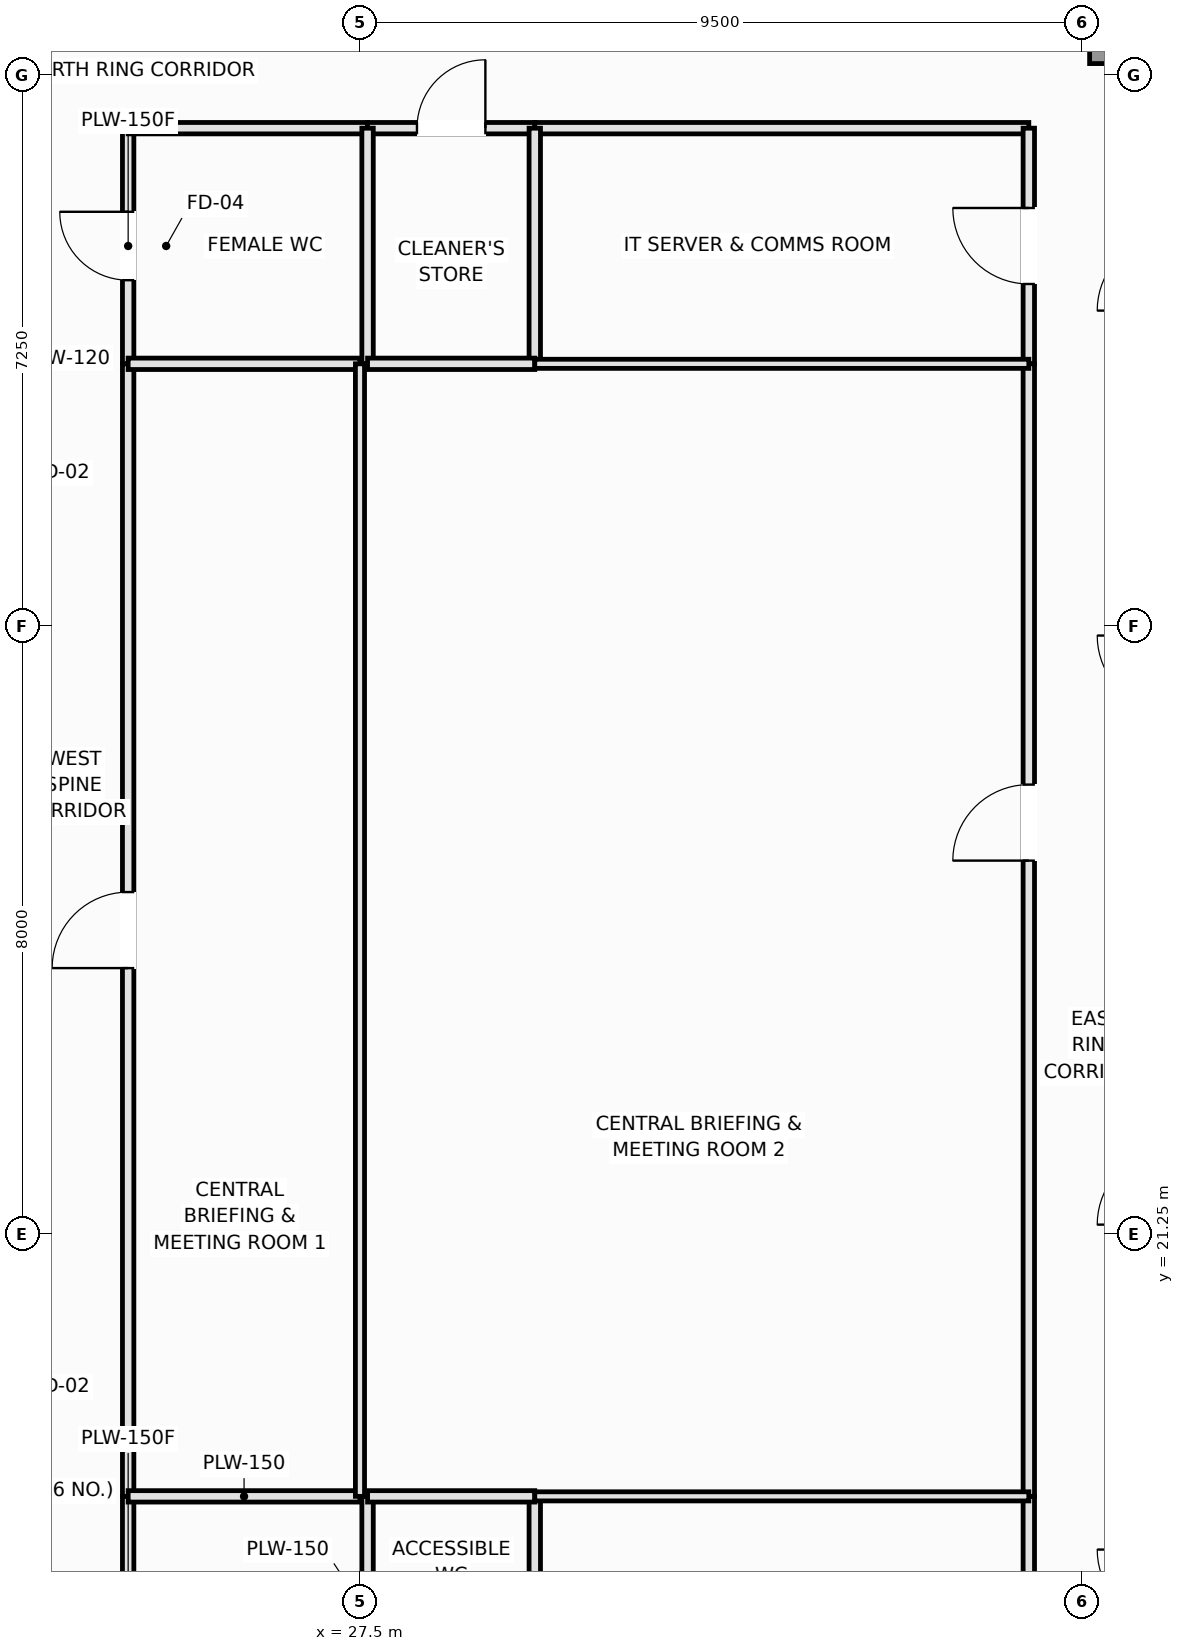
"""IFC4 building model, lengths in metres.
Left out: names, types, materials, properties, quantities, classifications, styles, units other than length and angle.
Written with IfcOpenShell. Run it as: python <this file> out.ifc"""

import sys

from ifc_helpers import new_model, si_unit, direction, frame, frame_2d, origin, origin_2d, place, context, subcontext, project, spatial, rectangle, extrude, element, fill, save


model = new_model("IFC4")
c1 = context("Model", 3, precision=1e-05, world=origin(), true_north=direction((0.0, 1.0)))
c2 = subcontext(c1, "Body", "Model", "MODEL_VIEW")
j1 = project(units=[si_unit("LENGTHUNIT", "METRE"), si_unit("PLANEANGLEUNIT", "RADIAN")], contexts=[c1])
p1 = place(None, origin())
s1 = spatial("IfcSite", under=j1, at=p1, CompositionType="ELEMENT")
p2 = place(p1, origin())
s2 = spatial("IfcBuilding", under=s1, at=p2, CompositionType="ELEMENT")
p3 = place(p2, frame((0.0, 0.0, 25.6)))
s3 = spatial("IfcBuildingStorey", under=s2, at=p3, CompositionType="ELEMENT", Elevation=25.6)
p4 = place(p3, frame((38.2, 37.75, 0.0), z_axis=(0.0, 0.0, 1.0), x_axis=(1.0, 0.0, 0.0)))
e1 = element("IfcColumn", 1, at=p4, inside=s3, PredefinedType="COLUMN", context=c2, shape_type="SweptSolid", body=[
    extrude(rectangle(XDim=2.2, YDim=2.2, at=origin_2d()), origin(), (0.0, 0.0, 1.0), 3.55),
])
p5 = place(p3, frame((24.45, 14.7, 0.0), z_axis=(0.0, 0.0, 1.0), x_axis=(0.0, 1.0, 0.0)))
e2 = element("IfcWall", 2, at=p5, inside=s3, PredefinedType="PLUMBINGWALL", context=c2, shape_type="SweptSolid", body=[
    extrude(rectangle(XDim=3.1, YDim=0.15, at=frame_2d((1.55, 0.0))), origin(), (0.0, 0.0, 1.0), 3.37),
])
p6 = place(p5, frame((1.1, 0.0, 0.0)))
e3 = element("IfcOpeningElement", 3, at=p6, cuts=e2, PredefinedType="OPENING", context=c2, shape_type="SweptSolid", body=[
    extrude(rectangle(XDim=0.9, YDim=2.1, at=frame_2d((0.45, 1.05))), frame((0.0, 0.085, 0.0), z_axis=(0.0, -1.0, 0.0), x_axis=(1.0, 0.0, 0.0)), (0.0, 0.0, 1.0), 0.17),
])
p7 = place(p3, frame((24.45, 32.7, 0.0), z_axis=(0.0, 0.0, 1.0), x_axis=(0.0, 1.0, 0.0)))
e4 = element("IfcWall", 4, at=p7, inside=s3, PredefinedType="PLUMBINGWALL", context=c2, shape_type="SweptSolid", body=[
    extrude(rectangle(XDim=3.1, YDim=0.15, at=frame_2d((1.55, 0.0))), origin(), (0.0, 0.0, 1.0), 3.37),
])
p8 = place(p7, frame((1.1, 0.0, 0.0)))
e5 = element("IfcOpeningElement", 5, at=p8, cuts=e4, PredefinedType="OPENING", context=c2, shape_type="SweptSolid", body=[
    extrude(rectangle(XDim=0.9, YDim=2.1, at=frame_2d((0.45, 1.05))), frame((0.0, 0.085, 0.0), z_axis=(0.0, -1.0, 0.0), x_axis=(1.0, 0.0, 0.0)), (0.0, 0.0, 1.0), 0.17),
])
p9 = place(p3, frame((24.45, 17.8, 0.0), z_axis=(0.0, 0.0, 1.0), x_axis=(0.0, 1.0, 0.0)))
e6 = element("IfcWall", 6, at=p9, inside=s3, PredefinedType="PARTITIONING", context=c2, shape_type="SweptSolid", body=[
    extrude(rectangle(XDim=14.9, YDim=0.15, at=frame_2d((7.45, 0.0))), origin(), (0.0, 0.0, 1.0), 3.37),
])
p10 = place(p9, frame((6.95, 0.0, 0.0)))
e7 = element("IfcOpeningElement", 7, at=p10, cuts=e6, PredefinedType="OPENING", context=c2, shape_type="SweptSolid", body=[
    extrude(rectangle(XDim=1.0, YDim=2.15, at=frame_2d((0.5, 1.075))), frame((0.0, 0.085, 0.0), z_axis=(0.0, -1.0, 0.0), x_axis=(1.0, 0.0, 0.0)), (0.0, 0.0, 1.0), 0.17),
])
p11 = place(p3, frame((24.45, 35.8, 0.0), z_axis=(0.0, 0.0, 1.0), x_axis=(1.0, 0.0, 0.0)))
e8 = element("IfcWall", 8, at=p11, inside=s3, PredefinedType="PLUMBINGWALL", context=c2, shape_type="SweptSolid", body=[
    extrude(rectangle(XDim=3.15, YDim=0.15, at=frame_2d((1.575, 0.0))), origin(), (0.0, 0.0, 1.0), 3.37),
])
p12 = place(p3, frame((27.6, 35.8, 0.0), z_axis=(0.0, 0.0, 1.0), x_axis=(1.0, 0.0, 0.0)))
e9 = element("IfcWall", 9, at=p12, inside=s3, PredefinedType="PLUMBINGWALL", context=c2, shape_type="SweptSolid", body=[
    extrude(rectangle(XDim=2.2, YDim=0.15, at=frame_2d((1.1, 0.0))), origin(), (0.0, 0.0, 1.0), 3.37),
])
p13 = place(p12, frame((0.65, 0.0, 0.0)))
e10 = element("IfcOpeningElement", 10, at=p13, cuts=e9, PredefinedType="OPENING", context=c2, shape_type="SweptSolid", body=[
    extrude(rectangle(XDim=0.9, YDim=2.1, at=frame_2d((0.45, 1.05))), frame((0.0, 0.085, 0.0), z_axis=(0.0, -1.0, 0.0), x_axis=(1.0, 0.0, 0.0)), (0.0, 0.0, 1.0), 0.17),
])
p14 = place(p3, frame((29.8, 35.8, 0.0), z_axis=(0.0, 0.0, 1.0), x_axis=(1.0, 0.0, 0.0)))
e11 = element("IfcWall", 11, at=p14, inside=s3, PredefinedType="PARTITIONING", context=c2, shape_type="SweptSolid", body=[
    extrude(rectangle(XDim=6.5, YDim=0.15, at=frame_2d((3.25, 0.0))), origin(), (0.0, 0.0, 1.0), 3.37),
])
p15 = place(p3, frame((36.3, 14.7, 0.0), z_axis=(0.0, 0.0, 1.0), x_axis=(0.0, 1.0, 0.0)))
e12 = element("IfcWall", 12, at=p15, inside=s3, PredefinedType="PARTITIONING", context=c2, shape_type="SweptSolid", body=[
    extrude(rectangle(XDim=3.1, YDim=0.15, at=frame_2d((1.55, 0.0))), origin(), (0.0, 0.0, 1.0), 3.37),
])
p16 = place(p15, frame((1.05, 0.0, 0.0)))
e13 = element("IfcOpeningElement", 13, at=p16, cuts=e12, PredefinedType="OPENING", context=c2, shape_type="SweptSolid", body=[
    extrude(rectangle(XDim=1.0, YDim=2.15, at=frame_2d((0.5, 1.075))), frame((0.0, 0.085, 0.0), z_axis=(0.0, -1.0, 0.0), x_axis=(1.0, 0.0, 0.0)), (0.0, 0.0, 1.0), 0.17),
])
p17 = place(p3, frame((36.3, 32.7, 0.0), z_axis=(0.0, 0.0, 1.0), x_axis=(0.0, 1.0, 0.0)))
e14 = element("IfcWall", 14, at=p17, inside=s3, PredefinedType="PARTITIONING", context=c2, shape_type="SweptSolid", body=[
    extrude(rectangle(XDim=3.1, YDim=0.15, at=frame_2d((1.55, 0.0))), origin(), (0.0, 0.0, 1.0), 3.37),
])
p18 = place(p17, frame((1.05, 0.0, 0.0)))
e15 = element("IfcOpeningElement", 15, at=p18, cuts=e14, PredefinedType="OPENING", context=c2, shape_type="SweptSolid", body=[
    extrude(rectangle(XDim=1.0, YDim=2.15, at=frame_2d((0.5, 1.075))), frame((0.0, 0.085, 0.0), z_axis=(0.0, -1.0, 0.0), x_axis=(1.0, 0.0, 0.0)), (0.0, 0.0, 1.0), 0.17),
])
p19 = place(p3, frame((36.3, 17.8, 0.0), z_axis=(0.0, 0.0, 1.0), x_axis=(0.0, 1.0, 0.0)))
e16 = element("IfcWall", 16, at=p19, inside=s3, PredefinedType="PARTITIONING", context=c2, shape_type="SweptSolid", body=[
    extrude(rectangle(XDim=14.9, YDim=0.15, at=frame_2d((7.45, 0.0))), origin(), (0.0, 0.0, 1.0), 3.37),
])
p20 = place(p19, frame((8.364, 0.0, 0.0)))
e17 = element("IfcOpeningElement", 17, at=p20, cuts=e16, PredefinedType="OPENING", context=c2, shape_type="SweptSolid", body=[
    extrude(rectangle(XDim=1.0, YDim=2.15, at=frame_2d((0.5, 1.075))), frame((0.0, 0.085, 0.0), z_axis=(0.0, -1.0, 0.0), x_axis=(1.0, 0.0, 0.0)), (0.0, 0.0, 1.0), 0.17),
])
p21 = place(p3, frame((27.6, 14.7, 0.0), z_axis=(0.0, 0.0, 1.0), x_axis=(0.0, 1.0, 0.0)))
e18 = element("IfcWall", 18, at=p21, inside=s3, PredefinedType="PLUMBINGWALL", context=c2, shape_type="SweptSolid", body=[
    extrude(rectangle(XDim=3.1, YDim=0.15, at=frame_2d((1.55, 0.0))), origin(), (0.0, 0.0, 1.0), 3.37),
])
p22 = place(p3, frame((24.45, 17.8, 0.0), z_axis=(0.0, 0.0, 1.0), x_axis=(1.0, 0.0, 0.0)))
e19 = element("IfcWall", 19, at=p22, inside=s3, PredefinedType="PLUMBINGWALL", context=c2, shape_type="SweptSolid", body=[
    extrude(rectangle(XDim=3.05, YDim=0.15, at=frame_2d((1.525, 0.0))), origin(), (0.0, 0.0, 1.0), 3.37),
])
p23 = place(p3, frame((27.6, 32.7, 0.0), z_axis=(0.0, 0.0, 1.0), x_axis=(0.0, 1.0, 0.0)))
e20 = element("IfcWall", 20, at=p23, inside=s3, PredefinedType="PLUMBINGWALL", context=c2, shape_type="SweptSolid", body=[
    extrude(rectangle(XDim=3.1, YDim=0.15, at=frame_2d((1.55, 0.0))), origin(), (0.0, 0.0, 1.0), 3.37),
])
p24 = place(p3, frame((24.45, 32.7, 0.0), z_axis=(0.0, 0.0, 1.0), x_axis=(1.0, 0.0, 0.0)))
e21 = element("IfcWall", 21, at=p24, inside=s3, PredefinedType="PLUMBINGWALL", context=c2, shape_type="SweptSolid", body=[
    extrude(rectangle(XDim=3.05, YDim=0.15, at=frame_2d((1.525, 0.0))), origin(), (0.0, 0.0, 1.0), 3.37),
])
p25 = place(p3, frame((29.8, 14.7, 0.0), z_axis=(0.0, 0.0, 1.0), x_axis=(0.0, 1.0, 0.0)))
e22 = element("IfcWall", 22, at=p25, inside=s3, PredefinedType="PLUMBINGWALL", context=c2, shape_type="SweptSolid", body=[
    extrude(rectangle(XDim=3.1, YDim=0.15, at=frame_2d((1.55, 0.0))), origin(), (0.0, 0.0, 1.0), 3.37),
])
p26 = place(p3, frame((27.6, 17.8, 0.0), z_axis=(0.0, 0.0, 1.0), x_axis=(1.0, 0.0, 0.0)))
e23 = element("IfcWall", 23, at=p26, inside=s3, PredefinedType="PLUMBINGWALL", context=c2, shape_type="SweptSolid", body=[
    extrude(rectangle(XDim=2.2, YDim=0.15, at=frame_2d((1.1, 0.0))), origin(), (0.0, 0.0, 1.0), 3.37),
])
p27 = place(p3, frame((29.8, 32.7, 0.0), z_axis=(0.0, 0.0, 1.0), x_axis=(0.0, 1.0, 0.0)))
e24 = element("IfcWall", 24, at=p27, inside=s3, PredefinedType="PLUMBINGWALL", context=c2, shape_type="SweptSolid", body=[
    extrude(rectangle(XDim=3.1, YDim=0.15, at=frame_2d((1.55, 0.0))), origin(), (0.0, 0.0, 1.0), 3.37),
])
p28 = place(p3, frame((27.6, 32.7, 0.0), z_axis=(0.0, 0.0, 1.0), x_axis=(1.0, 0.0, 0.0)))
e25 = element("IfcWall", 25, at=p28, inside=s3, PredefinedType="PLUMBINGWALL", context=c2, shape_type="SweptSolid", body=[
    extrude(rectangle(XDim=2.2, YDim=0.15, at=frame_2d((1.1, 0.0))), origin(), (0.0, 0.0, 1.0), 3.37),
])
for number, where, z_axis, x_axis in (
    (26, (29.8, 17.8, 0.0), (0.0, 0.0, 1.0), (1.0, 0.0, 0.0)),
    (27, (29.8, 32.7, 0.0), (0.0, 0.0, 1.0), (1.0, 0.0, 0.0)),
):
    element("IfcWall", number, at=place(p3, frame(where, z_axis=z_axis, x_axis=x_axis)), inside=s3, PredefinedType="PARTITIONING", context=c2, shape_type="SweptSolid", body=[
        extrude(rectangle(XDim=6.5, YDim=0.12, at=frame_2d((3.25, 0.0))), origin(), (0.0, 0.0, 1.0), 3.37),
    ])
p29 = place(p3, frame((27.5, 17.8, 0.0), z_axis=(0.0, 0.0, 1.0), x_axis=(0.0, 1.0, 0.0)))
e28 = element("IfcWall", 28, at=p29, inside=s3, PredefinedType="PARTITIONING", context=c2, shape_type="SweptSolid", body=[
    extrude(rectangle(XDim=14.9, YDim=0.12, at=frame_2d((7.45, 0.0))), origin(), (0.0, 0.0, 1.0), 3.37),
])
p30 = place(p8, origin())
e29 = element("IfcDoor", 29, at=p30, inside=s3, OperationType="SINGLE_SWING_RIGHT", PredefinedType="DOOR", context=c2, shape_type="SweptSolid", body=[
    extrude(rectangle(XDim=0.9, YDim=2.1, at=frame_2d((0.45, 1.05))), frame((0.0, 0.025, 0.0), z_axis=(0.0, -1.0, 0.0), x_axis=(1.0, 0.0, 0.0)), (0.0, 0.0, 1.0), 0.05),
])
fill(e5, e29)
p31 = place(p10, origin())
e30 = element("IfcDoor", 30, at=p31, inside=s3, OperationType="SINGLE_SWING_LEFT", PredefinedType="DOOR", context=c2, shape_type="SweptSolid", body=[
    extrude(rectangle(XDim=1.0, YDim=2.15, at=frame_2d((0.5, 1.075))), frame((0.0, 0.025, 0.0), z_axis=(0.0, -1.0, 0.0), x_axis=(1.0, 0.0, 0.0)), (0.0, 0.0, 1.0), 0.05),
])
fill(e7, e30)
p32 = place(p13, origin())
e31 = element("IfcDoor", 31, at=p32, inside=s3, OperationType="SINGLE_SWING_RIGHT", PredefinedType="DOOR", context=c2, shape_type="SweptSolid", body=[
    extrude(rectangle(XDim=0.9, YDim=2.1, at=frame_2d((0.45, 1.05))), frame((0.0, 0.025, 0.0), z_axis=(0.0, -1.0, 0.0), x_axis=(1.0, 0.0, 0.0)), (0.0, 0.0, 1.0), 0.05),
])
fill(e10, e31)
p33 = place(p18, origin())
e32 = element("IfcDoor", 32, at=p33, inside=s3, OperationType="SINGLE_SWING_RIGHT", PredefinedType="DOOR", context=c2, shape_type="SweptSolid", body=[
    extrude(rectangle(XDim=1.0, YDim=2.15, at=frame_2d((0.5, 1.075))), frame((0.0, 0.025, 0.0), z_axis=(0.0, -1.0, 0.0), x_axis=(1.0, 0.0, 0.0)), (0.0, 0.0, 1.0), 0.05),
])
fill(e15, e32)
p34 = place(p20, origin())
e33 = element("IfcDoor", 33, at=p34, inside=s3, OperationType="SINGLE_SWING_LEFT", PredefinedType="DOOR", context=c2, shape_type="SweptSolid", body=[
    extrude(rectangle(XDim=1.0, YDim=2.15, at=frame_2d((0.5, 1.075))), frame((0.0, 0.025, 0.0), z_axis=(0.0, -1.0, 0.0), x_axis=(1.0, 0.0, 0.0)), (0.0, 0.0, 1.0), 0.05),
])
fill(e17, e33)
save(model, sys.argv[1])
